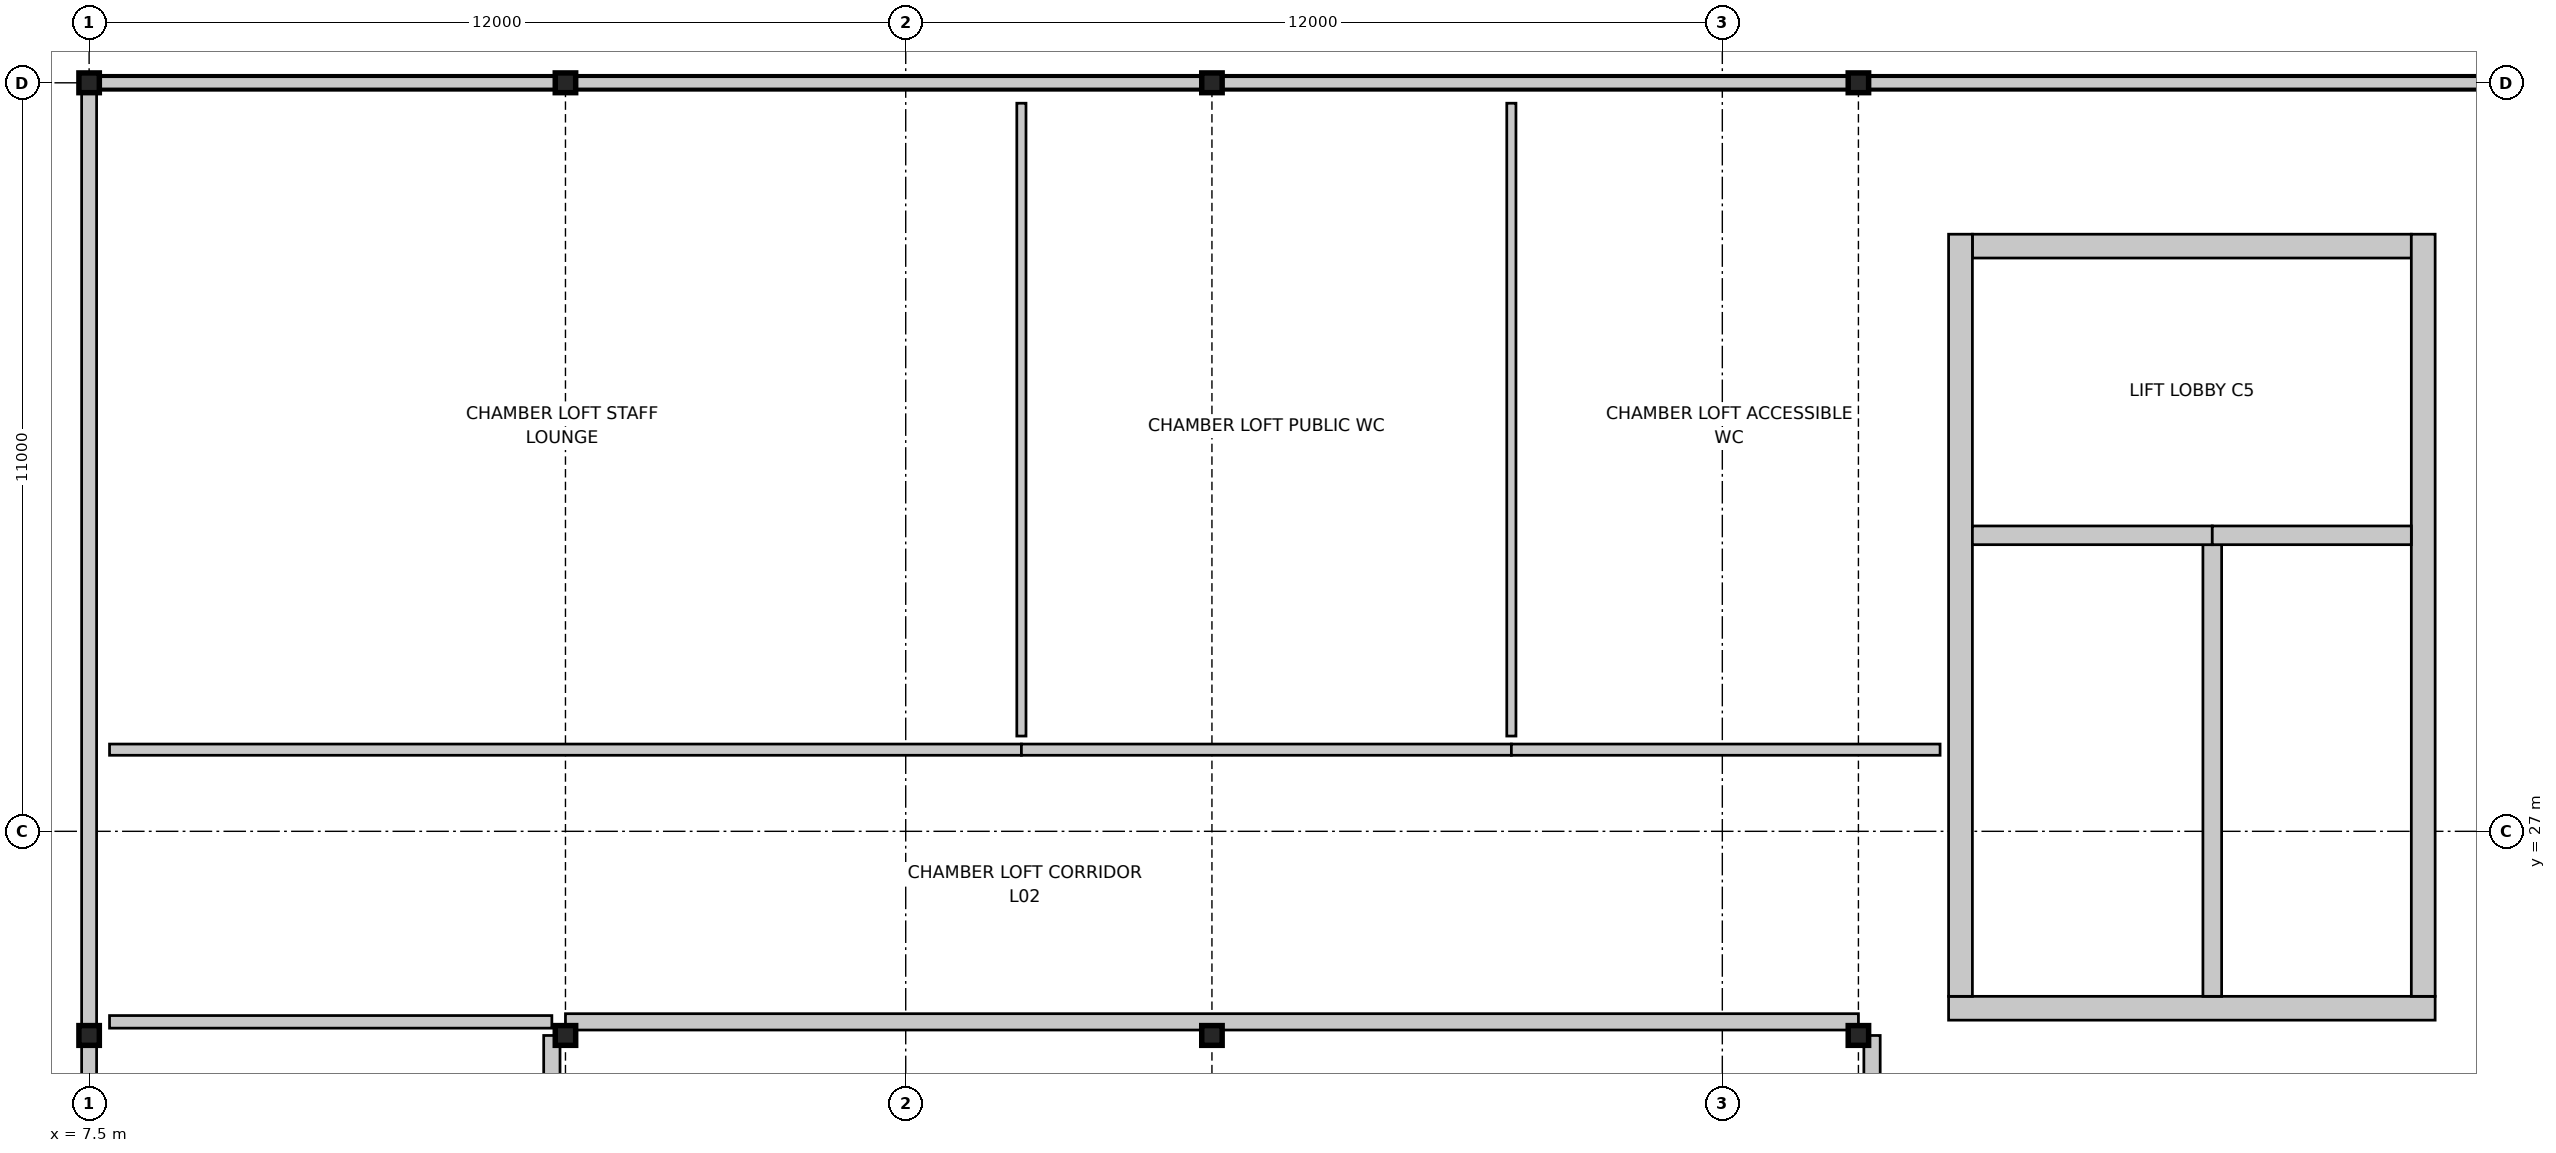
"""IFC4 building model, lengths in metres.
Left out: names, types, materials, properties, quantities, classifications, styles, units other than length and angle.
Written with IfcOpenShell. Run it as: python <this file> out.ifc"""

import sys

from ifc_helpers import new_model, si_unit, direction, frame, frame_2d, origin, origin_2d, place, context, subcontext, project, spatial, rectangle, i_section, extrude, element, fill, save


model = new_model("IFC4")
c1 = context("Model", 3, precision=1e-05, world=origin(), true_north=direction((0.0, 1.0)))
c2 = subcontext(c1, "Body", "Model", "MODEL_VIEW")
j1 = project(units=[si_unit("LENGTHUNIT", "METRE"), si_unit("PLANEANGLEUNIT", "RADIAN")], contexts=[c1])
p1 = place(None, origin())
s1 = spatial("IfcSite", under=j1, at=p1, CompositionType="ELEMENT")
p2 = place(p1, origin())
s2 = spatial("IfcBuilding", under=s1, at=p2, CompositionType="ELEMENT")
p3 = place(p2, frame((0.0, 0.0, 9.6)))
s3 = spatial("IfcBuildingStorey", under=s2, at=p3, CompositionType="ELEMENT", Elevation=9.6)
for number, where, z_axis, x_axis in (
    (1, (33.5, 38.0, 0.0), (0.0, 0.0, 1.0), (1.0, 0.0, 0.0)),
    (2, (24.0, 38.0, 0.0), (0.0, 0.0, 1.0), (1.0, 0.0, 0.0)),
    (3, (14.5, 38.0, 0.0), (0.0, 0.0, 1.0), (1.0, 0.0, 0.0)),
    (4, (7.5, 38.0, 0.0), (0.0, 0.0, 1.0), (1.0, 0.0, 0.0)),
    (5, (7.5, 24.0, 0.0), (0.0, 0.0, 1.0), (1.0, 0.0, 0.0)),
    (6, (14.5, 24.0, 0.0), (0.0, 0.0, 1.0), (1.0, 0.0, 0.0)),
    (7, (24.0, 24.0, 0.0), (0.0, 0.0, 1.0), (1.0, 0.0, 0.0)),
    (8, (33.5, 24.0, 0.0), (0.0, 0.0, 1.0), (1.0, 0.0, 0.0)),
):
    element("IfcColumn", number, at=place(p3, frame(where, z_axis=z_axis, x_axis=x_axis)), inside=s3, PredefinedType="COLUMN", context=c2, shape_type="SweptSolid", body=[
        extrude(i_section(OverallWidth=0.3, OverallDepth=0.29, WebThickness=0.009, FlangeThickness=0.014, FilletRadius=0.027, at=origin_2d()), origin(), (0.0, 0.0, 1.0), 4.8),
    ])
p4 = place(p3, frame((33.52, 38.0, 0.0), z_axis=(0.0, 0.0, 1.0), x_axis=(1.0, 0.0, 0.0)))
e9 = element("IfcWall", 9, at=p4, inside=s3, PredefinedType="SOLIDWALL", context=c2, shape_type="SweptSolid", body=[
    extrude(rectangle(XDim=10.96, YDim=0.22, at=frame_2d((5.48, 0.0))), origin(), (0.0, 0.0, 1.0), 3.848),
])
p5 = place(p3, frame((24.02, 38.0, 0.0), z_axis=(0.0, 0.0, 1.0), x_axis=(1.0, 0.0, 0.0)))
e10 = element("IfcWall", 10, at=p5, inside=s3, PredefinedType="SOLIDWALL", context=c2, shape_type="SweptSolid", body=[
    extrude(rectangle(XDim=9.46, YDim=0.22, at=frame_2d((4.73, 0.0))), origin(), (0.0, 0.0, 1.0), 3.848),
])
p6 = place(p3, frame((14.52, 38.0, 0.0), z_axis=(0.0, 0.0, 1.0), x_axis=(1.0, 0.0, 0.0)))
e11 = element("IfcWall", 11, at=p6, inside=s3, PredefinedType="SOLIDWALL", context=c2, shape_type="SweptSolid", body=[
    extrude(rectangle(XDim=9.46, YDim=0.22, at=frame_2d((4.73, 0.0))), origin(), (0.0, 0.0, 1.0), 3.848),
])
p7 = place(p6, frame((3.53, 0.0, 1.05)))
e12 = element("IfcOpeningElement", 12, at=p7, cuts=e11, PredefinedType="OPENING", context=c2, shape_type="SweptSolid", body=[
    extrude(rectangle(XDim=2.4, YDim=1.35, at=frame_2d((1.2, 0.675))), frame((0.0, 0.12, 0.0), z_axis=(0.0, -1.0, 0.0), x_axis=(1.0, 0.0, 0.0)), (0.0, 0.0, 1.0), 0.24),
])
p8 = place(p3, frame((7.52, 38.0, 0.0), z_axis=(0.0, 0.0, 1.0), x_axis=(1.0, 0.0, 0.0)))
e13 = element("IfcWall", 13, at=p8, inside=s3, PredefinedType="SOLIDWALL", context=c2, shape_type="SweptSolid", body=[
    extrude(rectangle(XDim=6.96, YDim=0.22, at=frame_2d((3.48, 0.0))), origin(), (0.0, 0.0, 1.0), 3.848),
])
p9 = place(p3, frame((7.5, 24.02, 0.0), z_axis=(0.0, 0.0, 1.0), x_axis=(0.0, 1.0, 0.0)))
e14 = element("IfcWall", 14, at=p9, inside=s3, PredefinedType="SOLIDWALL", context=c2, shape_type="SweptSolid", body=[
    extrude(rectangle(XDim=13.96, YDim=0.22, at=frame_2d((6.98, 0.0))), origin(), (0.0, 0.0, 1.0), 3.848),
])
p10 = place(p3, frame((7.5, 11.52, 0.0), z_axis=(0.0, 0.0, 1.0), x_axis=(0.0, 1.0, 0.0)))
e15 = element("IfcWall", 15, at=p10, inside=s3, PredefinedType="SOLIDWALL", context=c2, shape_type="SweptSolid", body=[
    extrude(rectangle(XDim=12.46, YDim=0.22, at=frame_2d((6.23, 0.0))), origin(), (0.0, 0.0, 1.0), 3.848),
])
p11 = place(p10, frame((5.38, 0.0, 1.6)))
e16 = element("IfcOpeningElement", 16, at=p11, cuts=e15, PredefinedType="OPENING", context=c2, shape_type="SweptSolid", body=[
    extrude(rectangle(XDim=1.7, YDim=0.95, at=frame_2d((0.85, 0.475))), frame((0.0, 0.12, 0.0), z_axis=(0.0, -1.0, 0.0), x_axis=(1.0, 0.0, 0.0)), (0.0, 0.0, 1.0), 0.24),
])
p12 = place(p3, frame((7.6, 38.0, 4.8), z_axis=(0.0, 0.0, 1.0), x_axis=(1.0, 0.0, 0.0)))
e17 = element("IfcWall", 17, at=p12, inside=s3, PredefinedType="PARAPET", context=c2, shape_type="SweptSolid", body=[
    extrude(rectangle(XDim=36.8, YDim=0.18, at=frame_2d((18.4, 0.0))), origin(), (0.0, 0.0, 1.0), 0.65),
])
p13 = place(p3, frame((34.825, 24.4, 0.0), z_axis=(0.0, 0.0, 1.0), x_axis=(1.0, 0.0, 0.0)))
e18 = element("IfcWall", 18, at=p13, inside=s3, PredefinedType="SHEAR", context=c2, shape_type="SweptSolid", body=[
    extrude(rectangle(XDim=7.15, YDim=0.35, at=frame_2d((3.575, 0.0))), origin(), (0.0, 0.0, 1.0), 4.55),
])
p14 = place(p3, frame((35.175, 35.6, 0.0), z_axis=(0.0, 0.0, 1.0), x_axis=(1.0, 0.0, 0.0)))
e19 = element("IfcWall", 19, at=p14, inside=s3, PredefinedType="SHEAR", context=c2, shape_type="SweptSolid", body=[
    extrude(rectangle(XDim=6.45, YDim=0.35, at=frame_2d((3.225, 0.0))), origin(), (0.0, 0.0, 1.0), 4.55),
])
p15 = place(p14, frame((2.5, 0.0, 0.0)))
e20 = element("IfcOpeningElement", 20, at=p15, cuts=e19, PredefinedType="OPENING", context=c2, shape_type="SweptSolid", body=[
    extrude(rectangle(XDim=1.45, YDim=2.2, at=frame_2d((0.725, 1.1))), frame((0.0, 0.185, 0.0), z_axis=(0.0, -1.0, 0.0), x_axis=(1.0, 0.0, 0.0)), (0.0, 0.0, 1.0), 0.37),
])
for number, where, z_axis, x_axis in (
    (21, (35.0, 24.575, 0.0), (0.0, 0.0, 1.0), (0.0, 1.0, 0.0)),
    (22, (41.8, 24.575, 0.0), (0.0, 0.0, 1.0), (0.0, 1.0, 0.0)),
):
    element("IfcWall", number, at=place(p3, frame(where, z_axis=z_axis, x_axis=x_axis)), inside=s3, PredefinedType="SHEAR", context=c2, shape_type="SweptSolid", body=[
        extrude(rectangle(XDim=11.2, YDim=0.35, at=frame_2d((5.6, 0.0))), origin(), (0.0, 0.0, 1.0), 4.55),
    ])
p16 = place(p3, frame((38.7, 24.575, 0.0), z_axis=(0.0, 0.0, 1.0), x_axis=(0.0, 1.0, 0.0)))
e23 = element("IfcWall", 23, at=p16, inside=s3, PredefinedType="SHEAR", context=c2, shape_type="SweptSolid", body=[
    extrude(rectangle(XDim=6.637, YDim=0.275, at=frame_2d((3.319, 0.0))), origin(), (0.0, 0.0, 1.0), 4.55),
])
p17 = place(p3, frame((35.175, 31.35, 0.0), z_axis=(0.0, 0.0, 1.0), x_axis=(1.0, 0.0, 0.0)))
e24 = element("IfcWall", 24, at=p17, inside=s3, PredefinedType="SHEAR", context=c2, shape_type="SweptSolid", body=[
    extrude(rectangle(XDim=3.525, YDim=0.275, at=frame_2d((1.762, 0.0))), origin(), (0.0, 0.0, 1.0), 4.55),
])
p18 = place(p17, frame((1.835, 0.0, 0.0)))
e25 = element("IfcOpeningElement", 25, at=p18, cuts=e24, PredefinedType="OPENING", context=c2, shape_type="SweptSolid", body=[
    extrude(rectangle(XDim=1.2, YDim=2.15, at=frame_2d((0.6, 1.075))), frame((0.0, 0.147, 0.0), z_axis=(0.0, -1.0, 0.0), x_axis=(1.0, 0.0, 0.0)), (0.0, 0.0, 1.0), 0.295),
])
p19 = place(p3, frame((38.7, 31.35, 0.0), z_axis=(0.0, 0.0, 1.0), x_axis=(1.0, 0.0, 0.0)))
e26 = element("IfcWall", 26, at=p19, inside=s3, PredefinedType="SHEAR", context=c2, shape_type="SweptSolid", body=[
    extrude(rectangle(XDim=2.925, YDim=0.275, at=frame_2d((1.462, 0.0))), origin(), (0.0, 0.0, 1.0), 4.55),
])
p20 = place(p19, frame((0.982, 0.0, 0.0)))
e27 = element("IfcOpeningElement", 27, at=p20, cuts=e26, PredefinedType="OPENING", context=c2, shape_type="SweptSolid", body=[
    extrude(rectangle(XDim=1.1, YDim=2.15, at=frame_2d((0.55, 1.075))), frame((0.0, 0.147, 0.0), z_axis=(0.0, -1.0, 0.0), x_axis=(1.0, 0.0, 0.0)), (0.0, 0.0, 1.0), 0.295),
])
for number, where, z_axis, x_axis in (
    (28, (14.3, 11.5, 0.0), (0.0, 0.0, 1.0), (0.0, 1.0, 0.0)),
    (29, (33.7, 11.5, 0.0), (0.0, 0.0, 1.0), (0.0, 1.0, 0.0)),
):
    element("IfcWall", number, at=place(p3, frame(where, z_axis=z_axis, x_axis=x_axis)), inside=s3, PredefinedType="PARTITIONING", context=c2, shape_type="SweptSolid", body=[
        extrude(rectangle(XDim=12.5, YDim=0.24, at=frame_2d((6.25, 0.0))), origin(), (0.0, 0.0, 1.0), 3.85),
    ])
p21 = place(p3, frame((7.8, 24.2, 0.0), z_axis=(0.0, 0.0, 1.0), x_axis=(1.0, 0.0, 0.0)))
e30 = element("IfcWall", 30, at=p21, inside=s3, PredefinedType="PARTITIONING", context=c2, shape_type="SweptSolid", body=[
    extrude(rectangle(XDim=6.5, YDim=0.185, at=frame_2d((3.25, 0.0))), origin(), (0.0, 0.0, 1.0), 3.85),
])
p22 = place(p21, frame((2.7, 0.0, 0.0)))
e31 = element("IfcOpeningElement", 31, at=p22, cuts=e30, PredefinedType="OPENING", context=c2, shape_type="SweptSolid", body=[
    extrude(rectangle(XDim=1.1, YDim=2.15, at=frame_2d((0.55, 1.075))), frame((0.0, 0.103, 0.0), z_axis=(0.0, -1.0, 0.0), x_axis=(1.0, 0.0, 0.0)), (0.0, 0.0, 1.0), 0.205),
])
p23 = place(p3, frame((14.5, 24.2, 0.0), z_axis=(0.0, 0.0, 1.0), x_axis=(1.0, 0.0, 0.0)))
e32 = element("IfcWall", 32, at=p23, inside=s3, PredefinedType="PARTITIONING", context=c2, shape_type="SweptSolid", body=[
    extrude(rectangle(XDim=19.0, YDim=0.24, at=frame_2d((9.5, 0.0))), origin(), (0.0, 0.0, 1.0), 3.85),
])
p24 = place(p3, frame((7.8, 28.2, 0.0), z_axis=(0.0, 0.0, 1.0), x_axis=(1.0, 0.0, 0.0)))
e33 = element("IfcWall", 33, at=p24, inside=s3, PredefinedType="PARTITIONING", context=c2, shape_type="SweptSolid", body=[
    extrude(rectangle(XDim=13.4, YDim=0.165, at=frame_2d((6.7, 0.0))), origin(), (0.0, 0.0, 1.0), 3.85),
])
p25 = place(p24, frame((6.24, 0.0, 0.0)))
e34 = element("IfcOpeningElement", 34, at=p25, cuts=e33, PredefinedType="OPENING", context=c2, shape_type="SweptSolid", body=[
    extrude(rectangle(XDim=0.92, YDim=2.1, at=frame_2d((0.46, 1.05))), frame((0.0, 0.093, 0.0), z_axis=(0.0, -1.0, 0.0), x_axis=(1.0, 0.0, 0.0)), (0.0, 0.0, 1.0), 0.185),
])
p26 = place(p3, frame((21.2, 28.2, 0.0), z_axis=(0.0, 0.0, 1.0), x_axis=(1.0, 0.0, 0.0)))
e35 = element("IfcWall", 35, at=p26, inside=s3, PredefinedType="PARTITIONING", context=c2, shape_type="SweptSolid", body=[
    extrude(rectangle(XDim=7.2, YDim=0.165, at=frame_2d((3.6, 0.0))), origin(), (0.0, 0.0, 1.0), 3.85),
])
p27 = place(p26, frame((3.16, 0.0, 0.0)))
e36 = element("IfcOpeningElement", 36, at=p27, cuts=e35, PredefinedType="OPENING", context=c2, shape_type="SweptSolid", body=[
    extrude(rectangle(XDim=0.88, YDim=2.1, at=frame_2d((0.44, 1.05))), frame((0.0, 0.093, 0.0), z_axis=(0.0, -1.0, 0.0), x_axis=(1.0, 0.0, 0.0)), (0.0, 0.0, 1.0), 0.185),
])
p28 = place(p3, frame((28.4, 28.2, 0.0), z_axis=(0.0, 0.0, 1.0), x_axis=(1.0, 0.0, 0.0)))
e37 = element("IfcWall", 37, at=p28, inside=s3, PredefinedType="PARTITIONING", context=c2, shape_type="SweptSolid", body=[
    extrude(rectangle(XDim=6.3, YDim=0.165, at=frame_2d((3.15, 0.0))), origin(), (0.0, 0.0, 1.0), 3.85),
])
p29 = place(p28, frame((2.625, 0.0, 0.0)))
e38 = element("IfcOpeningElement", 38, at=p29, cuts=e37, PredefinedType="OPENING", context=c2, shape_type="SweptSolid", body=[
    extrude(rectangle(XDim=1.05, YDim=2.15, at=frame_2d((0.525, 1.075))), frame((0.0, 0.093, 0.0), z_axis=(0.0, -1.0, 0.0), x_axis=(1.0, 0.0, 0.0)), (0.0, 0.0, 1.0), 0.185),
])
for number, where, z_axis, x_axis in (
    (39, (21.2, 28.4, 0.0), (0.0, 0.0, 1.0), (0.0, 1.0, 0.0)),
    (40, (28.4, 28.4, 0.0), (0.0, 0.0, 1.0), (0.0, 1.0, 0.0)),
):
    element("IfcWall", number, at=place(p3, frame(where, z_axis=z_axis, x_axis=x_axis)), inside=s3, PredefinedType="PARTITIONING", context=c2, shape_type="SweptSolid", body=[
        extrude(rectangle(XDim=9.3, YDim=0.135, at=frame_2d((4.65, 0.0))), origin(), (0.0, 0.0, 1.0), 4.544),
    ])
p30 = place(p7, origin())
e41 = element("IfcWindow", 41, at=p30, inside=s3, PartitioningType="SINGLE_PANEL", PredefinedType="WINDOW", context=c2, shape_type="SweptSolid", body=[
    extrude(rectangle(XDim=2.4, YDim=1.35, at=frame_2d((1.2, 0.675))), frame((0.0, 0.03, 0.0), z_axis=(0.0, -1.0, 0.0), x_axis=(1.0, 0.0, 0.0)), (0.0, 0.0, 1.0), 0.06),
])
fill(e12, e41)
p31 = place(p18, origin())
e42 = element("IfcDoor", 42, at=p31, inside=s3, OperationType="SINGLE_SWING_RIGHT", PredefinedType="DOOR", context=c2, shape_type="SweptSolid", body=[
    extrude(rectangle(XDim=1.2, YDim=2.15, at=frame_2d((0.6, 1.075))), frame((0.0, 0.025, 0.0), z_axis=(0.0, -1.0, 0.0), x_axis=(1.0, 0.0, 0.0)), (0.0, 0.0, 1.0), 0.05),
])
fill(e25, e42)
p32 = place(p20, origin())
e43 = element("IfcDoor", 43, at=p32, inside=s3, OperationType="DOUBLE_DOOR_SLIDING", PredefinedType="DOOR", context=c2, shape_type="SweptSolid", body=[
    extrude(rectangle(XDim=1.1, YDim=2.15, at=frame_2d((0.55, 1.075))), frame((0.0, 0.025, 0.0), z_axis=(0.0, -1.0, 0.0), x_axis=(1.0, 0.0, 0.0)), (0.0, 0.0, 1.0), 0.05),
])
fill(e27, e43)
p33 = place(p15, origin())
e44 = element("IfcDoor", 44, at=p33, inside=s3, OperationType="SINGLE_SWING_LEFT", PredefinedType="DOOR", context=c2, shape_type="SweptSolid", body=[
    extrude(rectangle(XDim=1.45, YDim=2.2, at=frame_2d((0.725, 1.1))), frame((0.0, 0.025, 0.0), z_axis=(0.0, -1.0, 0.0), x_axis=(1.0, 0.0, 0.0)), (0.0, 0.0, 1.0), 0.05),
])
fill(e20, e44)
p34 = place(p22, origin())
e45 = element("IfcDoor", 45, at=p34, inside=s3, OperationType="SINGLE_SWING_LEFT", PredefinedType="DOOR", context=c2, shape_type="SweptSolid", body=[
    extrude(rectangle(XDim=1.1, YDim=2.15, at=frame_2d((0.55, 1.075))), frame((0.0, 0.025, 0.0), z_axis=(0.0, -1.0, 0.0), x_axis=(1.0, 0.0, 0.0)), (0.0, 0.0, 1.0), 0.05),
])
fill(e31, e45)
p35 = place(p25, origin())
e46 = element("IfcDoor", 46, at=p35, inside=s3, OperationType="SINGLE_SWING_RIGHT", PredefinedType="DOOR", context=c2, shape_type="SweptSolid", body=[
    extrude(rectangle(XDim=0.92, YDim=2.1, at=frame_2d((0.46, 1.05))), frame((0.0, 0.025, 0.0), z_axis=(0.0, -1.0, 0.0), x_axis=(1.0, 0.0, 0.0)), (0.0, 0.0, 1.0), 0.05),
])
fill(e34, e46)
p36 = place(p27, origin())
e47 = element("IfcDoor", 47, at=p36, inside=s3, OperationType="SINGLE_SWING_LEFT", PredefinedType="DOOR", context=c2, shape_type="SweptSolid", body=[
    extrude(rectangle(XDim=0.88, YDim=2.1, at=frame_2d((0.44, 1.05))), frame((0.0, 0.025, 0.0), z_axis=(0.0, -1.0, 0.0), x_axis=(1.0, 0.0, 0.0)), (0.0, 0.0, 1.0), 0.05),
])
fill(e36, e47)
p37 = place(p29, origin())
e48 = element("IfcDoor", 48, at=p37, inside=s3, OperationType="SINGLE_SWING_RIGHT", PredefinedType="DOOR", context=c2, shape_type="SweptSolid", body=[
    extrude(rectangle(XDim=1.05, YDim=2.15, at=frame_2d((0.525, 1.075))), frame((0.0, 0.025, 0.0), z_axis=(0.0, -1.0, 0.0), x_axis=(1.0, 0.0, 0.0)), (0.0, 0.0, 1.0), 0.05),
])
fill(e38, e48)
save(model, sys.argv[1])
